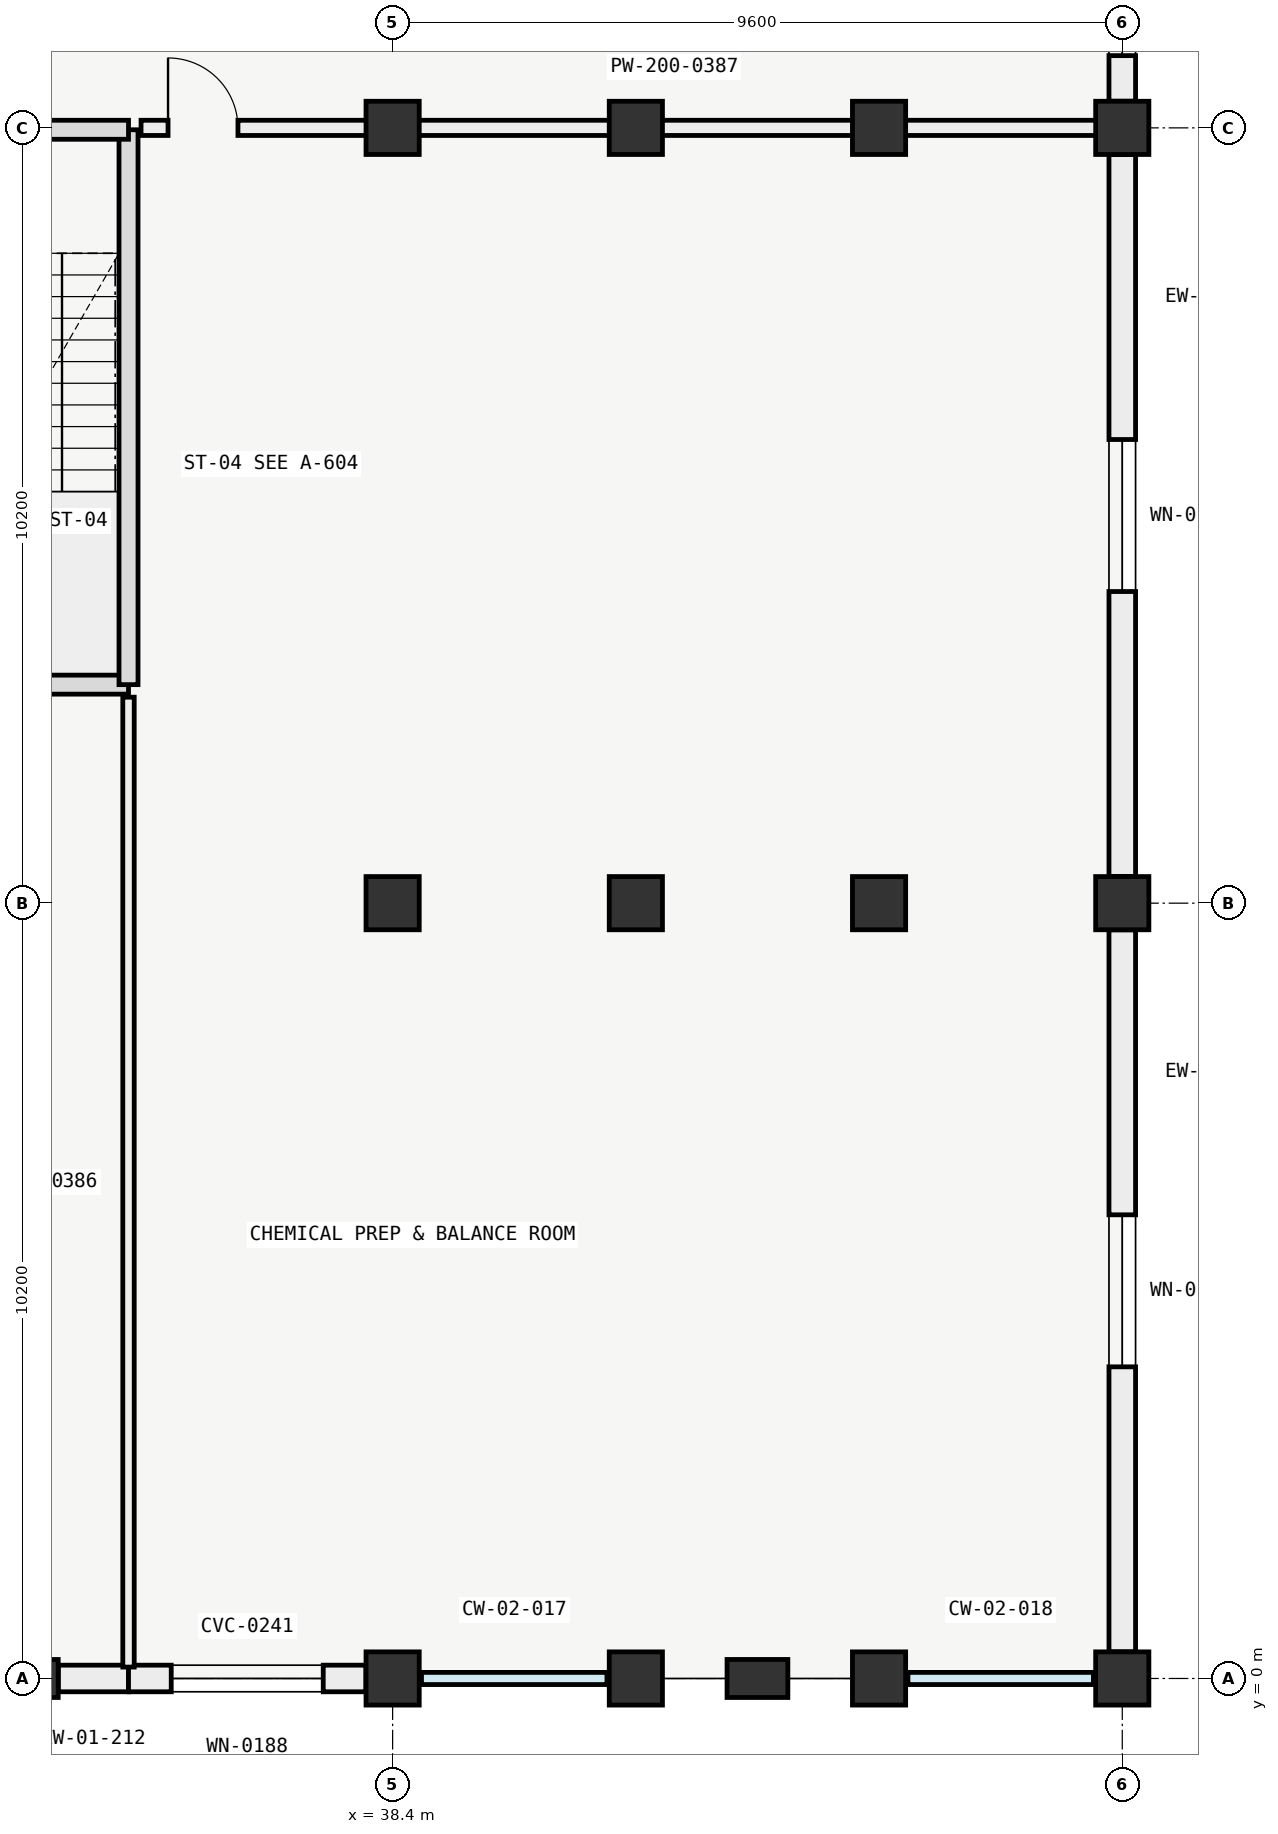
"""IFC4 building model, lengths in metres.
Left out: names, types, materials, properties, quantities, classifications, styles, units other than length and angle.
Written with IfcOpenShell. Run it as: python <this file> out.ifc"""

import sys

from ifc_helpers import new_model, si_unit, direction, frame, frame_2d, origin, origin_2d, place, context, subcontext, project, spatial, rectangle, extrude, element, fill, save


model = new_model("IFC4")
c1 = context("Model", 3, precision=1e-05, world=origin(), true_north=direction((0.0, 1.0)))
c2 = subcontext(c1, "Body", "Model", "MODEL_VIEW")
j1 = project(units=[si_unit("LENGTHUNIT", "METRE"), si_unit("PLANEANGLEUNIT", "RADIAN")], contexts=[c1])
p1 = place(None, origin())
s1 = spatial("IfcSite", under=j1, at=p1, CompositionType="ELEMENT")
p2 = place(p1, origin())
s2 = spatial("IfcBuilding", under=s1, at=p2, CompositionType="ELEMENT")
p3 = place(p2, frame((0.0, 0.0, 9.6)))
s3 = spatial("IfcBuildingStorey", under=s2, at=p3, CompositionType="ELEMENT", Elevation=9.6)
for number, where, z_axis, x_axis in (
    (1, (38.4, 0.0, 0.0), (0.0, 0.0, 1.0), (1.0, 0.0, 0.0)),
    (2, (38.4, 10.2, 0.0), (0.0, 0.0, 1.0), (1.0, 0.0, 0.0)),
    (3, (38.4, 20.4, 0.0), (0.0, 0.0, 1.0), (1.0, 0.0, 0.0)),
    (4, (41.6, 0.0, 0.0), (0.0, 0.0, 1.0), (1.0, 0.0, 0.0)),
    (5, (41.6, 10.2, 0.0), (0.0, 0.0, 1.0), (1.0, 0.0, 0.0)),
    (6, (41.6, 20.4, 0.0), (0.0, 0.0, 1.0), (1.0, 0.0, 0.0)),
    (7, (44.8, 0.0, 0.0), (0.0, 0.0, 1.0), (1.0, 0.0, 0.0)),
    (8, (44.8, 10.2, 0.0), (0.0, 0.0, 1.0), (1.0, 0.0, 0.0)),
    (9, (44.8, 20.4, 0.0), (0.0, 0.0, 1.0), (1.0, 0.0, 0.0)),
    (10, (48.0, 0.0, 0.0), (0.0, 0.0, 1.0), (1.0, 0.0, 0.0)),
    (11, (48.0, 10.2, 0.0), (0.0, 0.0, 1.0), (1.0, 0.0, 0.0)),
    (12, (48.0, 20.4, 0.0), (0.0, 0.0, 1.0), (1.0, 0.0, 0.0)),
):
    element("IfcColumn", number, at=place(p3, frame(where, z_axis=z_axis, x_axis=x_axis)), inside=s3, PredefinedType="COLUMN", context=c2, shape_type="SweptSolid", body=[
        extrude(rectangle(XDim=0.7, YDim=0.7, at=origin_2d()), origin(), (0.0, 0.0, 1.0), 4.2),
    ])
for number, where, z_axis, x_axis in (
    (13, (33.6, 0.0, 0.0), (0.0, 0.0, 1.0), (0.0, 1.0, 0.0)),
    (14, (43.2, 0.0, 0.0), (0.0, 0.0, 1.0), (0.0, 1.0, 0.0)),
):
    element("IfcColumn", number, at=place(p3, frame(where, z_axis=z_axis, x_axis=x_axis)), inside=s3, PredefinedType="PILASTER", context=c2, shape_type="SweptSolid", body=[
        extrude(rectangle(XDim=0.5, YDim=0.8, at=origin_2d()), origin(), (0.0, 0.0, 1.0), 4.2),
    ])
p4 = place(p3, frame((34.925, 0.0, 0.0), z_axis=(0.0, 0.0, 1.0), x_axis=(-1.0, 0.0, 0.0)))
e15 = element("IfcWall", 15, at=p4, inside=s3, PredefinedType="SOLIDWALL", context=c2, shape_type="SweptSolid", body=[
    extrude(rectangle(XDim=0.924, YDim=0.35, at=frame_2d((0.462, 0.0))), origin(), (0.0, 0.0, 1.0), 2.723),
])
p5 = place(p3, frame((38.049, 0.0, 0.0), z_axis=(0.0, 0.0, 1.0), x_axis=(-1.0, 0.0, 0.0)))
e16 = element("IfcWall", 16, at=p5, inside=s3, PredefinedType="SOLIDWALL", context=c2, shape_type="SweptSolid", body=[
    extrude(rectangle(XDim=3.124, YDim=0.35, at=frame_2d((1.562, 0.0))), origin(), (0.0, 0.0, 1.0), 2.723),
])
p6 = place(p5, frame((0.562, 0.0, 0.8)))
e17 = element("IfcOpeningElement", 17, at=p6, cuts=e16, PredefinedType="OPENING", context=c2, shape_type="SweptSolid", body=[
    extrude(rectangle(XDim=2.0, YDim=1.35, at=frame_2d((1.0, 0.675))), frame((0.0, 0.185, 0.0), z_axis=(0.0, -1.0, 0.0), x_axis=(1.0, 0.0, 0.0)), (0.0, 0.0, 1.0), 0.37),
])
p7 = place(p3, frame((48.0, 9.849, 0.0), z_axis=(0.0, 0.0, 1.0), x_axis=(0.0, -1.0, 0.0)))
e18 = element("IfcWall", 18, at=p7, inside=s3, PredefinedType="SOLIDWALL", context=c2, shape_type="SweptSolid", body=[
    extrude(rectangle(XDim=9.498, YDim=0.35, at=frame_2d((4.749, 0.0))), origin(), (0.0, 0.0, 1.0), 3.28),
])
p8 = place(p7, frame((3.749, 0.0, 0.85)))
e19 = element("IfcOpeningElement", 19, at=p8, cuts=e18, PredefinedType="OPENING", context=c2, shape_type="SweptSolid", body=[
    extrude(rectangle(XDim=2.0, YDim=1.35, at=frame_2d((1.0, 0.675))), frame((0.0, 0.185, 0.0), z_axis=(0.0, -1.0, 0.0), x_axis=(1.0, 0.0, 0.0)), (0.0, 0.0, 1.0), 0.37),
])
p9 = place(p3, frame((48.0, 20.049, 0.0), z_axis=(0.0, 0.0, 1.0), x_axis=(0.0, -1.0, 0.0)))
e20 = element("IfcWall", 20, at=p9, inside=s3, PredefinedType="SOLIDWALL", context=c2, shape_type="SweptSolid", body=[
    extrude(rectangle(XDim=9.498, YDim=0.35, at=frame_2d((4.749, 0.0))), origin(), (0.0, 0.0, 1.0), 3.28),
])
p10 = place(p9, frame((3.749, 0.0, 0.85)))
e21 = element("IfcOpeningElement", 21, at=p10, cuts=e20, PredefinedType="OPENING", context=c2, shape_type="SweptSolid", body=[
    extrude(rectangle(XDim=2.0, YDim=1.35, at=frame_2d((1.0, 0.675))), frame((0.0, 0.185, 0.0), z_axis=(0.0, -1.0, 0.0), x_axis=(1.0, 0.0, 0.0)), (0.0, 0.0, 1.0), 0.37),
])
p11 = place(p3, frame((48.0, 23.95, 0.0), z_axis=(0.0, 0.0, 1.0), x_axis=(0.0, -1.0, 0.0)))
e22 = element("IfcWall", 22, at=p11, inside=s3, PredefinedType="SOLIDWALL", context=c2, shape_type="SweptSolid", body=[
    extrude(rectangle(XDim=3.199, YDim=0.35, at=frame_2d((1.6, 0.0))), origin(), (0.0, 0.0, 1.0), 3.28),
])
p12 = place(p11, frame((0.6, 0.0, 0.75)))
e23 = element("IfcOpeningElement", 23, at=p12, cuts=e22, PredefinedType="OPENING", context=c2, shape_type="SweptSolid", body=[
    extrude(rectangle(XDim=2.0, YDim=1.35, at=frame_2d((1.0, 0.675))), frame((0.0, 0.185, 0.0), z_axis=(0.0, -1.0, 0.0), x_axis=(1.0, 0.0, 0.0)), (0.0, 0.0, 1.0), 0.37),
])
p13 = place(p3, frame((31.475, 13.075, 0.0), z_axis=(0.0, 0.0, 1.0), x_axis=(1.0, 0.0, 0.0)))
e24 = element("IfcWall", 24, at=p13, inside=s3, PredefinedType="SOLIDWALL", context=c2, shape_type="SweptSolid", body=[
    extrude(rectangle(XDim=3.45, YDim=0.25, at=frame_2d((1.725, 0.0))), origin(), (0.0, 0.0, 1.0), 3.95),
])
p14 = place(p3, frame((34.925, 13.075, 0.0), z_axis=(0.0, 0.0, 1.0), x_axis=(0.0, 1.0, 0.0)))
e25 = element("IfcWall", 25, at=p14, inside=s3, PredefinedType="SOLIDWALL", context=c2, shape_type="SweptSolid", body=[
    extrude(rectangle(XDim=7.3, YDim=0.25, at=frame_2d((3.65, 0.0))), origin(), (0.0, 0.0, 1.0), 3.95),
])
p15 = place(p3, frame((34.925, 20.375, 0.0), z_axis=(0.0, 0.0, 1.0), x_axis=(-1.0, 0.0, 0.0)))
e26 = element("IfcWall", 26, at=p15, inside=s3, PredefinedType="SOLIDWALL", context=c2, shape_type="SweptSolid", body=[
    extrude(rectangle(XDim=3.45, YDim=0.25, at=frame_2d((1.725, 0.0))), origin(), (0.0, 0.0, 1.0), 3.95),
])
p16 = place(p15, frame((1.175, 0.0, 0.0)))
e27 = element("IfcOpeningElement", 27, at=p16, cuts=e26, PredefinedType="OPENING", context=c2, shape_type="SweptSolid", body=[
    extrude(rectangle(XDim=1.1, YDim=2.2, at=frame_2d((0.55, 1.1))), frame((0.0, 0.135, 0.0), z_axis=(0.0, -1.0, 0.0), x_axis=(1.0, 0.0, 0.0)), (0.0, 0.0, 1.0), 0.27),
])
p17 = place(p3, frame((34.925, 0.15, 0.0), z_axis=(0.0, 0.0, 1.0), x_axis=(0.0, 1.0, 0.0)))
e28 = element("IfcWall", 28, at=p17, inside=s3, PredefinedType="PARTITIONING", context=c2, shape_type="SweptSolid", body=[
    extrude(rectangle(XDim=12.76, YDim=0.15, at=frame_2d((6.38, 0.0))), origin(), (0.0, 0.0, 1.0), 3.33),
])
p18 = place(p3, frame((35.09, 20.4, 0.0), z_axis=(0.0, 0.0, 1.0), x_axis=(1.0, 0.0, 0.0)))
e29 = element("IfcWall", 29, at=p18, inside=s3, PredefinedType="PARTITIONING", context=c2, shape_type="SweptSolid", body=[
    extrude(rectangle(XDim=12.76, YDim=0.2, at=frame_2d((6.38, 0.0))), origin(), (0.0, 0.0, 1.0), 3.28),
])
p19 = place(p18, frame((0.355, 0.0, 0.0)))
e30 = element("IfcOpeningElement", 30, at=p19, cuts=e29, PredefinedType="OPENING", context=c2, shape_type="SweptSolid", body=[
    extrude(rectangle(XDim=0.92, YDim=2.1, at=frame_2d((0.46, 1.05))), frame((0.0, 0.11, 0.0), z_axis=(0.0, -1.0, 0.0), x_axis=(1.0, 0.0, 0.0)), (0.0, 0.0, 1.0), 0.22),
])
p20 = place(p6, origin())
e31 = element("IfcWindow", 31, at=p20, inside=s3, PartitioningType="SINGLE_PANEL", PredefinedType="WINDOW", context=c2, shape_type="SweptSolid", body=[
    extrude(rectangle(XDim=2.0, YDim=1.35, at=frame_2d((1.0, 0.675))), frame((0.0, 0.03, 0.0), z_axis=(0.0, -1.0, 0.0), x_axis=(1.0, 0.0, 0.0)), (0.0, 0.0, 1.0), 0.06),
])
fill(e17, e31)
p21 = place(p8, origin())
e32 = element("IfcWindow", 32, at=p21, inside=s3, PartitioningType="SINGLE_PANEL", PredefinedType="WINDOW", context=c2, shape_type="SweptSolid", body=[
    extrude(rectangle(XDim=2.0, YDim=1.35, at=frame_2d((1.0, 0.675))), frame((0.0, 0.03, 0.0), z_axis=(0.0, -1.0, 0.0), x_axis=(1.0, 0.0, 0.0)), (0.0, 0.0, 1.0), 0.06),
])
fill(e19, e32)
p22 = place(p10, origin())
e33 = element("IfcWindow", 33, at=p22, inside=s3, PartitioningType="SINGLE_PANEL", PredefinedType="WINDOW", context=c2, shape_type="SweptSolid", body=[
    extrude(rectangle(XDim=2.0, YDim=1.35, at=frame_2d((1.0, 0.675))), frame((0.0, 0.03, 0.0), z_axis=(0.0, -1.0, 0.0), x_axis=(1.0, 0.0, 0.0)), (0.0, 0.0, 1.0), 0.06),
])
fill(e21, e33)
p23 = place(p12, origin())
e34 = element("IfcWindow", 34, at=p23, inside=s3, PartitioningType="SINGLE_PANEL", PredefinedType="WINDOW", context=c2, shape_type="SweptSolid", body=[
    extrude(rectangle(XDim=2.0, YDim=1.35, at=frame_2d((1.0, 0.675))), frame((0.0, 0.03, 0.0), z_axis=(0.0, -1.0, 0.0), x_axis=(1.0, 0.0, 0.0)), (0.0, 0.0, 1.0), 0.06),
])
fill(e23, e34)
p24 = place(p19, origin())
e35 = element("IfcDoor", 35, at=p24, inside=s3, OperationType="SINGLE_SWING_LEFT", PredefinedType="DOOR", context=c2, shape_type="SweptSolid", body=[
    extrude(rectangle(XDim=0.92, YDim=2.1, at=frame_2d((0.46, 1.05))), frame((0.0, 0.025, 0.0), z_axis=(0.0, -1.0, 0.0), x_axis=(1.0, 0.0, 0.0)), (0.0, 0.0, 1.0), 0.05),
])
fill(e30, e35)
save(model, sys.argv[1])
